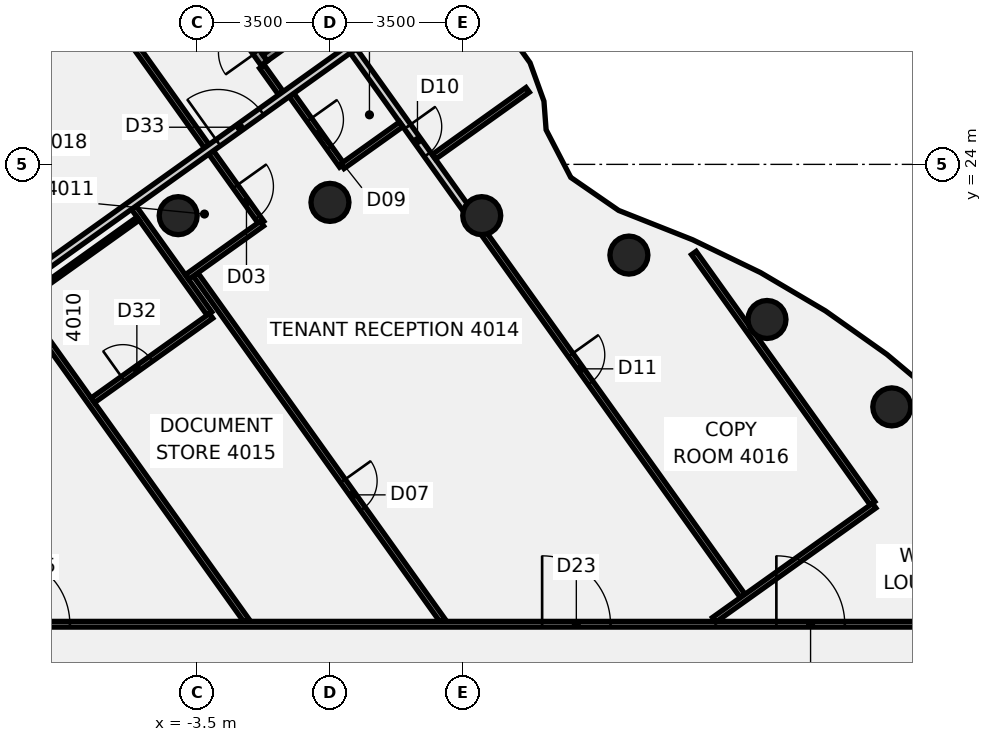
"""IFC4 building model, lengths in metres.
Left out: names, types, materials, properties, quantities, classifications, styles, units other than length and angle.
Written with IfcOpenShell. Run it as: python <this file> out.ifc"""

import sys

from ifc_helpers import new_model, si_unit, direction, frame, frame_2d, origin, origin_2d, place, context, subcontext, project, spatial, rectangle, circle, extrude, element, fill, save


model = new_model("IFC4")
c1 = context("Model", 3, precision=1e-05, world=origin(), true_north=direction((0.0, 1.0)))
c2 = subcontext(c1, "Body", "Model", "MODEL_VIEW")
j1 = project(units=[si_unit("LENGTHUNIT", "METRE"), si_unit("PLANEANGLEUNIT", "RADIAN")], contexts=[c1])
p1 = place(None, origin())
s1 = spatial("IfcSite", under=j1, at=p1, CompositionType="ELEMENT")
p2 = place(p1, origin())
s2 = spatial("IfcBuilding", under=s1, at=p2, CompositionType="ELEMENT")
p3 = place(p2, frame((0.0, 0.0, 163.0)))
s3 = spatial("IfcBuildingStorey", under=s2, at=p3, CompositionType="ELEMENT", Elevation=163.0)
for number, where, z_axis, x_axis in (
    (1, (14.784, 17.619, -0.14), (0.0, 0.0, 1.0), (1.0, 0.0, 0.0)),
    (2, (11.5, 19.919, -0.14), (0.0, 0.0, 1.0), (1.0, 0.0, 0.0)),
    (3, (7.866, 21.613, -0.14), (0.0, 0.0, 1.0), (1.0, 0.0, 0.0)),
    (4, (3.994, 22.651, -0.14), (0.0, 0.0, 1.0), (1.0, 0.0, 0.0)),
    (5, (0.0, 23.0, -0.14), (0.0, 0.0, 1.0), (1.0, 0.0, 0.0)),
    (6, (-3.994, 22.651, -0.14), (0.0, 0.0, 1.0), (1.0, 0.0, 0.0)),
):
    element("IfcColumn", number, at=place(p3, frame(where, z_axis=z_axis, x_axis=x_axis)), inside=s3, PredefinedType="COLUMN", context=c2, shape_type="SweptSolid", body=[
        extrude(circle(Radius=0.5, at=origin_2d()), origin(), (0.0, 0.0, 1.0), 3.75),
    ])
p4 = place(p3, frame((-10.982, 35.318, 0.0), z_axis=(0.0, 0.0, 1.0), x_axis=(0.581048167979, -0.813869170376, 0.0)))
e7 = element("IfcWall", 7, at=p4, inside=s3, PredefinedType="PARTITIONING", context=c2, shape_type="SweptSolid", body=[
    extrude(rectangle(XDim=15.801, YDim=0.15, at=frame_2d((7.9, 0.0))), origin(), (0.0, 0.0, 1.0), 3.01),
])
p5 = place(p4, frame((14.621, 0.0, 0.0)))
e8 = element("IfcOpeningElement", 8, at=p5, cuts=e7, PredefinedType="OPENING", context=c2, shape_type="SweptSolid", body=[
    extrude(rectangle(XDim=1.0, YDim=2.1, at=frame_2d((0.5, 1.05))), frame((0.0, 0.085, 0.0), z_axis=(0.0, -1.0, 0.0), x_axis=(1.0, 0.0, 0.0)), (0.0, 0.0, 1.0), 0.17),
])
p6 = place(p4, frame((4.42, 0.0, 0.0)))
e9 = element("IfcOpeningElement", 9, at=p6, cuts=e7, PredefinedType="OPENING", context=c2, shape_type="SweptSolid", body=[
    extrude(rectangle(XDim=0.9, YDim=2.1, at=frame_2d((0.45, 1.05))), frame((0.0, 0.085, 0.0), z_axis=(0.0, -1.0, 0.0), x_axis=(1.0, 0.0, 0.0)), (0.0, 0.0, 1.0), 0.17),
])
p7 = place(p3, frame((-10.144, 23.129, 0.0), z_axis=(0.0, 0.0, 1.0), x_axis=(0.581021948815, -0.813887888468, 0.0)))
e10 = element("IfcWall", 10, at=p7, inside=s3, PredefinedType="PARTITIONING", context=c2, shape_type="SweptSolid", body=[
    extrude(rectangle(XDim=13.671, YDim=0.15, at=frame_2d((6.836, 0.0))), origin(), (0.0, 0.0, 1.0), 3.01),
])
p8 = place(p3, frame((-1.789, 26.572, 0.0), z_axis=(0.0, 0.0, 1.0), x_axis=(0.581022214268, -0.813887698965, 0.0)))
e11 = element("IfcWall", 11, at=p8, inside=s3, PredefinedType="PARTITIONING", context=c2, shape_type="SweptSolid", body=[
    extrude(rectangle(XDim=0.855, YDim=0.15, at=frame_2d((0.428, 0.0))), origin(), (0.0, 0.0, 1.0), 3.01),
])
p9 = place(p3, frame((-5.161, 22.861, 0.0), z_axis=(0.0, 0.0, 1.0), x_axis=(0.581002146179, -0.813902024899, 0.0)))
e12 = element("IfcWall", 12, at=p9, inside=s3, PredefinedType="PARTITIONING", context=c2, shape_type="SweptSolid", body=[
    extrude(rectangle(XDim=3.425, YDim=0.15, at=frame_2d((1.712, 0.0))), origin(), (0.0, 0.0, 1.0), 3.01),
])
p10 = place(p3, frame((-3.534, 21.099, 0.0), z_axis=(0.0, 0.0, 1.0), x_axis=(0.58105429552, -0.813864795687, 0.0)))
e13 = element("IfcWall", 13, at=p10, inside=s3, PredefinedType="PARTITIONING", context=c2, shape_type="SweptSolid", body=[
    extrude(rectangle(XDim=11.178, YDim=0.15, at=frame_2d((5.589, 0.0))), origin(), (0.0, 0.0, 1.0), 3.01),
])
p11 = place(p10, frame((6.67, 0.0, 0.0)))
e14 = element("IfcOpeningElement", 14, at=p11, cuts=e13, PredefinedType="OPENING", context=c2, shape_type="SweptSolid", body=[
    extrude(rectangle(XDim=0.9, YDim=2.1, at=frame_2d((0.45, 1.05))), frame((0.0, 0.085, 0.0), z_axis=(0.0, -1.0, 0.0), x_axis=(1.0, 0.0, 0.0)), (0.0, 0.0, 1.0), 0.17),
])
p12 = place(p3, frame((-1.01, 25.825, 0.0), z_axis=(0.0, 0.0, 1.0), x_axis=(0.58098490275, -0.813914333807, 0.0)))
e15 = element("IfcWall", 15, at=p12, inside=s3, PredefinedType="PARTITIONING", context=c2, shape_type="SweptSolid", body=[
    extrude(rectangle(XDim=2.28, YDim=0.15, at=frame_2d((1.14, 0.0))), origin(), (0.0, 0.0, 1.0), 3.01),
])
p13 = place(p12, frame((0.8, 0.0, 0.0)))
e16 = element("IfcOpeningElement", 16, at=p13, cuts=e15, PredefinedType="OPENING", context=c2, shape_type="SweptSolid", body=[
    extrude(rectangle(XDim=0.9, YDim=2.1, at=frame_2d((0.45, 1.05))), frame((0.0, 0.085, 0.0), z_axis=(0.0, -1.0, 0.0), x_axis=(1.0, 0.0, 0.0)), (0.0, 0.0, 1.0), 0.17),
])
p14 = place(p3, frame((0.617, 26.987, 0.0), z_axis=(0.0, 0.0, 1.0), x_axis=(0.581238193719, -0.813733471207, 0.0)))
e17 = element("IfcWall", 17, at=p14, inside=s3, PredefinedType="PARTITIONING", context=c2, shape_type="SweptSolid", body=[
    extrude(rectangle(XDim=5.261, YDim=0.2, at=frame_2d((2.63, 0.0))), origin(), (0.0, 0.0, 1.0), 3.01),
])
p15 = place(p14, frame((2.45, 0.0, 0.0)))
e18 = element("IfcOpeningElement", 18, at=p15, cuts=e17, PredefinedType="OPENING", context=c2, shape_type="SweptSolid", body=[
    extrude(rectangle(XDim=0.9, YDim=2.1, at=frame_2d((0.45, 1.05))), frame((0.0, 0.11, 0.0), z_axis=(0.0, -1.0, 0.0), x_axis=(1.0, 0.0, 0.0)), (0.0, 0.0, 1.0), 0.22),
])
p16 = place(p3, frame((3.937, 22.339, 0.0), z_axis=(0.0, 0.0, 1.0), x_axis=(0.581240132919, -0.813732086061, 0.0)))
e19 = element("IfcWall", 19, at=p16, inside=s3, PredefinedType="PARTITIONING", context=c2, shape_type="SweptSolid", body=[
    extrude(rectangle(XDim=11.909, YDim=0.15, at=frame_2d((5.955, 0.0))), origin(), (0.0, 0.0, 1.0), 3.01),
])
p17 = place(p16, frame((4.121, 0.0, 0.0)))
e20 = element("IfcOpeningElement", 20, at=p17, cuts=e19, PredefinedType="OPENING", context=c2, shape_type="SweptSolid", body=[
    extrude(rectangle(XDim=0.9, YDim=2.1, at=frame_2d((0.45, 1.05))), frame((0.0, 0.085, 0.0), z_axis=(0.0, -1.0, 0.0), x_axis=(1.0, 0.0, 0.0)), (0.0, 0.0, 1.0), 0.17),
])
p18 = place(p3, frame((9.575, 21.667, 0.0), z_axis=(0.0, 0.0, 1.0), x_axis=(0.581066903394, -0.813855794217, 0.0)))
e21 = element("IfcWall", 21, at=p18, inside=s3, PredefinedType="PARTITIONING", context=c2, shape_type="SweptSolid", body=[
    extrude(rectangle(XDim=8.09, YDim=0.15, at=frame_2d((4.045, 0.0))), origin(), (0.0, 0.0, 1.0), 3.01),
])
p19 = place(p3, frame((-17.065, 11.9, 0.0), z_axis=(0.0, 0.0, 1.0), x_axis=(1.0, 0.0, 0.0)))
e22 = element("IfcWall", 22, at=p19, inside=s3, PredefinedType="PARTITIONING", context=c2, shape_type="SweptSolid", body=[
    extrude(rectangle(XDim=34.165, YDim=0.15, at=frame_2d((17.083, 0.0))), origin(), (0.0, 0.0, 1.0), 3.01),
])
p20 = place(p19, frame((22.648, 0.0, 0.0)))
e23 = element("IfcOpeningElement", 23, at=p20, cuts=e22, PredefinedType="OPENING", context=c2, shape_type="SweptSolid", body=[
    extrude(rectangle(XDim=1.8, YDim=2.1, at=frame_2d((0.9, 1.05))), frame((0.0, 0.085, 0.0), z_axis=(0.0, -1.0, 0.0), x_axis=(1.0, 0.0, 0.0)), (0.0, 0.0, 1.0), 0.17),
])
p21 = place(p19, frame((28.812, 0.0, 0.0)))
e24 = element("IfcOpeningElement", 24, at=p21, cuts=e22, PredefinedType="OPENING", context=c2, shape_type="SweptSolid", body=[
    extrude(rectangle(XDim=1.8, YDim=2.1, at=frame_2d((0.9, 1.05))), frame((0.0, 0.085, 0.0), z_axis=(0.0, -1.0, 0.0), x_axis=(1.0, 0.0, 0.0)), (0.0, 0.0, 1.0), 0.17),
])
p22 = place(p19, frame((8.421, 0.0, 0.0)))
e25 = element("IfcOpeningElement", 25, at=p22, cuts=e22, PredefinedType="OPENING", context=c2, shape_type="SweptSolid", body=[
    extrude(rectangle(XDim=1.8, YDim=2.1, at=frame_2d((0.9, 1.05))), frame((0.0, 0.085, 0.0), z_axis=(0.0, -1.0, 0.0), x_axis=(1.0, 0.0, 0.0)), (0.0, 0.0, 1.0), 0.17),
])
p23 = place(p3, frame((-3.76, 21.036, 0.0), z_axis=(0.0, 0.0, 1.0), x_axis=(0.814210336766, 0.580570002241, 0.0)))
e26 = element("IfcWall", 26, at=p23, inside=s3, PredefinedType="PARTITIONING", context=c2, shape_type="SweptSolid", body=[
    extrude(rectangle(XDim=2.42, YDim=0.15, at=frame_2d((1.21, 0.0))), origin(), (0.0, 0.0, 1.0), 3.01),
])
p24 = place(p3, frame((0.327, 23.951, 0.0), z_axis=(0.0, 0.0, 1.0), x_axis=(0.814245381544, 0.580520851162, 0.0)))
e27 = element("IfcWall", 27, at=p24, inside=s3, PredefinedType="PARTITIONING", context=c2, shape_type="SweptSolid", body=[
    extrude(rectangle(XDim=1.9, YDim=0.15, at=frame_2d((0.95, 0.0))), origin(), (0.0, 0.0, 1.0), 3.01),
])
p25 = place(p3, frame((10.11, 12.016, 0.0), z_axis=(0.0, 0.0, 1.0), x_axis=(0.81419877711, 0.580586213541, 0.0)))
e28 = element("IfcWall", 28, at=p25, inside=s3, PredefinedType="PARTITIONING", context=c2, shape_type="SweptSolid", body=[
    extrude(rectangle(XDim=5.173, YDim=0.15, at=frame_2d((2.586, 0.0))), origin(), (0.0, 0.0, 1.0), 3.01),
])
p26 = place(p3, frame((-8.1, 20.395, 0.0), z_axis=(0.0, 0.0, 1.0), x_axis=(0.813865417851, 0.581053424072, 0.0)))
e29 = element("IfcWall", 29, at=p26, inside=s3, PredefinedType="PARTITIONING", context=c2, shape_type="SweptSolid", body=[
    extrude(rectangle(XDim=3.75, YDim=0.1, at=frame_2d((1.875, 0.0))), origin(), (0.0, 0.0, 1.0), 3.01),
])
p27 = place(p3, frame((-6.237, 17.793, 0.0), z_axis=(0.0, 0.0, 1.0), x_axis=(0.813875956833, 0.58103866213, 0.0)))
e30 = element("IfcWall", 30, at=p27, inside=s3, PredefinedType="PARTITIONING", context=c2, shape_type="SweptSolid", body=[
    extrude(rectangle(XDim=3.82, YDim=0.15, at=frame_2d((1.91, 0.0))), origin(), (0.0, 0.0, 1.0), 3.01),
])
p28 = place(p27, frame((0.97, 0.0, 0.0)))
e31 = element("IfcOpeningElement", 31, at=p28, cuts=e30, PredefinedType="OPENING", context=c2, shape_type="SweptSolid", body=[
    extrude(rectangle(XDim=0.9, YDim=2.1, at=frame_2d((0.45, 1.05))), frame((0.0, 0.085, 0.0), z_axis=(0.0, -1.0, 0.0), x_axis=(1.0, 0.0, 0.0)), (0.0, 0.0, 1.0), 0.17),
])
p29 = place(p3, frame((2.736, 24.199, 0.0), z_axis=(0.0, 0.0, 1.0), x_axis=(0.813853186895, 0.581070555252, 0.0)))
e32 = element("IfcWall", 32, at=p29, inside=s3, PredefinedType="PARTITIONING", context=c2, shape_type="SweptSolid", body=[
    extrude(rectangle(XDim=3.031, YDim=0.15, at=frame_2d((1.516, 0.0))), origin(), (0.0, 0.0, 1.0), 3.01),
])
p30 = place(p3, frame((-7.422, 21.369, 0.0), z_axis=(0.0, 0.0, 1.0), x_axis=(0.813698226371, 0.581287533326, 0.0)))
e33 = element("IfcWall", 33, at=p30, inside=s3, PredefinedType="PARTITIONING", context=c2, shape_type="SweptSolid", body=[
    extrude(rectangle(XDim=13.106, YDim=0.2, at=frame_2d((6.553, 0.0))), origin(), (0.0, 0.0, 1.0), 3.01),
])
p31 = place(p30, frame((5.507, 0.0, 0.0)))
e34 = element("IfcOpeningElement", 34, at=p31, cuts=e33, PredefinedType="OPENING", context=c2, shape_type="SweptSolid", body=[
    extrude(rectangle(XDim=1.4, YDim=2.1, at=frame_2d((0.7, 1.05))), frame((0.0, 0.11, 0.0), z_axis=(0.0, -1.0, 0.0), x_axis=(1.0, 0.0, 0.0)), (0.0, 0.0, 1.0), 0.22),
])
p32 = place(p3, frame((-1.731, 26.662, -0.14), z_axis=(0.0, 0.0, 1.0), x_axis=(-0.581031354906, 0.813881173523, 0.0)))
e35 = element("IfcWall", 35, at=p32, inside=s3, PredefinedType="SHEAR", context=c2, shape_type="SweptSolid", body=[
    extrude(rectangle(XDim=6.7, YDim=0.2, at=frame_2d((3.35, 0.0))), origin(), (0.0, 0.0, 1.0), 3.15),
])
p33 = place(p32, frame((0.35, 0.0, 0.0)))
e36 = element("IfcOpeningElement", 36, at=p33, cuts=e35, PredefinedType="OPENING", context=c2, shape_type="SweptSolid", body=[
    extrude(rectangle(XDim=1.0, YDim=2.1, at=frame_2d((0.5, 1.05))), frame((0.0, 0.11, 0.0), z_axis=(0.0, -1.0, 0.0), x_axis=(1.0, 0.0, 0.0)), (0.0, 0.0, 1.0), 0.22),
])
p34 = place(p3, frame((0.897, 28.661, -0.14), z_axis=(0.0, 0.0, 1.0), x_axis=(-0.813852022761, -0.581072185746, 0.0)))
e37 = element("IfcWall", 37, at=p34, inside=s3, PredefinedType="SHEAR", context=c2, shape_type="SweptSolid", body=[
    extrude(rectangle(XDim=3.2, YDim=0.2, at=frame_2d((1.6, 0.0))), origin(), (0.0, 0.0, 1.0), 3.15),
])
p35 = place(p5, frame((1.0, 0.0, 0.0), z_axis=(0.0, 0.0, 1.0), x_axis=(-1.0, 0.0, 0.0)))
e38 = element("IfcDoor", 38, at=p35, inside=s3, OperationType="SINGLE_SWING_RIGHT", PredefinedType="DOOR", context=c2, shape_type="SweptSolid", body=[
    extrude(rectangle(XDim=1.0, YDim=2.1, at=frame_2d((0.5, 1.05))), frame((0.0, 0.025, 0.0), z_axis=(0.0, -1.0, 0.0), x_axis=(1.0, 0.0, 0.0)), (0.0, 0.0, 1.0), 0.05),
])
fill(e8, e38)
p36 = place(p11, frame((0.9, 0.0, 0.0), z_axis=(0.0, 0.0, 1.0), x_axis=(-1.0, 0.0, 0.0)))
e39 = element("IfcDoor", 39, at=p36, inside=s3, OperationType="SINGLE_SWING_RIGHT", PredefinedType="DOOR", context=c2, shape_type="SweptSolid", body=[
    extrude(rectangle(XDim=0.9, YDim=2.1, at=frame_2d((0.45, 1.05))), frame((0.0, 0.025, 0.0), z_axis=(0.0, -1.0, 0.0), x_axis=(1.0, 0.0, 0.0)), (0.0, 0.0, 1.0), 0.05),
])
fill(e14, e39)
p37 = place(p13, origin())
e40 = element("IfcDoor", 40, at=p37, inside=s3, OperationType="SINGLE_SWING_LEFT", PredefinedType="DOOR", context=c2, shape_type="SweptSolid", body=[
    extrude(rectangle(XDim=0.9, YDim=2.1, at=frame_2d((0.45, 1.05))), frame((0.0, 0.025, 0.0), z_axis=(0.0, -1.0, 0.0), x_axis=(1.0, 0.0, 0.0)), (0.0, 0.0, 1.0), 0.05),
])
fill(e16, e40)
p38 = place(p15, origin())
e41 = element("IfcDoor", 41, at=p38, inside=s3, OperationType="SINGLE_SWING_LEFT", PredefinedType="DOOR", context=c2, shape_type="SweptSolid", body=[
    extrude(rectangle(XDim=0.9, YDim=2.1, at=frame_2d((0.45, 1.05))), frame((0.0, 0.025, 0.0), z_axis=(0.0, -1.0, 0.0), x_axis=(1.0, 0.0, 0.0)), (0.0, 0.0, 1.0), 0.05),
])
fill(e18, e41)
p39 = place(p17, origin())
e42 = element("IfcDoor", 42, at=p39, inside=s3, OperationType="SINGLE_SWING_RIGHT", PredefinedType="DOOR", context=c2, shape_type="SweptSolid", body=[
    extrude(rectangle(XDim=0.9, YDim=2.1, at=frame_2d((0.45, 1.05))), frame((0.0, 0.025, 0.0), z_axis=(0.0, -1.0, 0.0), x_axis=(1.0, 0.0, 0.0)), (0.0, 0.0, 1.0), 0.05),
])
fill(e20, e42)
p40 = place(p20, frame((1.8, 0.0, 0.0), z_axis=(0.0, 0.0, 1.0), x_axis=(-1.0, 0.0, 0.0)))
e43 = element("IfcDoor", 43, at=p40, inside=s3, OperationType="DOUBLE_DOOR_SINGLE_SWING", PredefinedType="DOOR", context=c2, shape_type="SweptSolid", body=[
    extrude(rectangle(XDim=1.8, YDim=2.1, at=frame_2d((0.9, 1.05))), frame((0.0, 0.025, 0.0), z_axis=(0.0, -1.0, 0.0), x_axis=(1.0, 0.0, 0.0)), (0.0, 0.0, 1.0), 0.05),
])
fill(e23, e43)
p41 = place(p21, origin())
e44 = element("IfcDoor", 44, at=p41, inside=s3, OperationType="DOUBLE_DOOR_SINGLE_SWING", PredefinedType="DOOR", context=c2, shape_type="SweptSolid", body=[
    extrude(rectangle(XDim=1.8, YDim=2.1, at=frame_2d((0.9, 1.05))), frame((0.0, 0.025, 0.0), z_axis=(0.0, -1.0, 0.0), x_axis=(1.0, 0.0, 0.0)), (0.0, 0.0, 1.0), 0.05),
])
fill(e24, e44)
p42 = place(p22, origin())
e45 = element("IfcDoor", 45, at=p42, inside=s3, OperationType="DOUBLE_DOOR_SINGLE_SWING", PredefinedType="DOOR", context=c2, shape_type="SweptSolid", body=[
    extrude(rectangle(XDim=1.8, YDim=2.1, at=frame_2d((0.9, 1.05))), frame((0.0, 0.025, 0.0), z_axis=(0.0, -1.0, 0.0), x_axis=(1.0, 0.0, 0.0)), (0.0, 0.0, 1.0), 0.05),
])
fill(e25, e45)
p43 = place(p28, origin())
e46 = element("IfcDoor", 46, at=p43, inside=s3, OperationType="SINGLE_SWING_RIGHT", PredefinedType="DOOR", context=c2, shape_type="SweptSolid", body=[
    extrude(rectangle(XDim=0.9, YDim=2.1, at=frame_2d((0.45, 1.05))), frame((0.0, 0.025, 0.0), z_axis=(0.0, -1.0, 0.0), x_axis=(1.0, 0.0, 0.0)), (0.0, 0.0, 1.0), 0.05),
])
fill(e31, e46)
p44 = place(p31, frame((1.4, 0.0, 0.0), z_axis=(0.0, 0.0, 1.0), x_axis=(-1.0, 0.0, 0.0)))
e47 = element("IfcDoor", 47, at=p44, inside=s3, OperationType="DOUBLE_DOOR_SINGLE_SWING", PredefinedType="DOOR", context=c2, shape_type="SweptSolid", body=[
    extrude(rectangle(XDim=1.4, YDim=2.1, at=frame_2d((0.7, 1.05))), frame((0.0, 0.025, 0.0), z_axis=(0.0, -1.0, 0.0), x_axis=(1.0, 0.0, 0.0)), (0.0, 0.0, 1.0), 0.05),
])
fill(e34, e47)
p45 = place(p33, origin())
e48 = element("IfcDoor", 48, at=p45, inside=s3, OperationType="SINGLE_SWING_LEFT", PredefinedType="DOOR", context=c2, shape_type="SweptSolid", body=[
    extrude(rectangle(XDim=1.0, YDim=2.1, at=frame_2d((0.5, 1.05))), frame((0.0, 0.025, 0.0), z_axis=(0.0, -1.0, 0.0), x_axis=(1.0, 0.0, 0.0)), (0.0, 0.0, 1.0), 0.05),
])
fill(e36, e48)
save(model, sys.argv[1])
